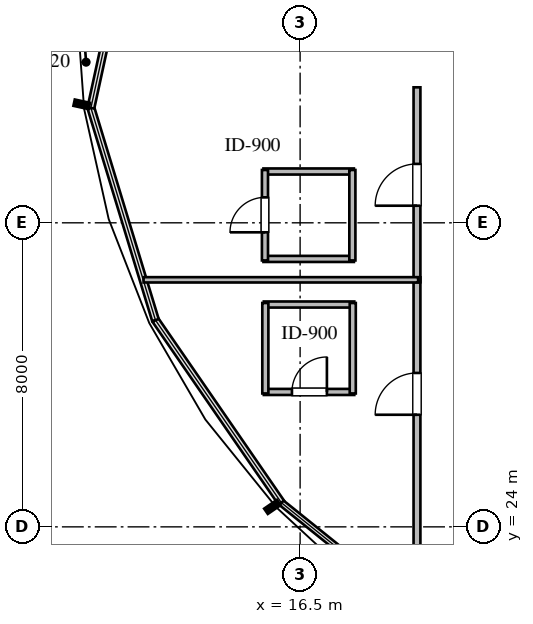
"""IFC4 building model, lengths in metres.
Left out: names, types, materials, properties, quantities, classifications, styles, units other than length and angle.
Written with IfcOpenShell. Run it as: python <this file> out.ifc"""

import sys

from ifc_helpers import new_model, si_unit, direction, frame, frame_2d, origin, place, context, subcontext, project, spatial, rectangle, extrude, element, fill, save


model = new_model("IFC4")
c1 = context("Model", 3, precision=1e-05, world=origin(), true_north=direction((0.0, 1.0)))
c2 = subcontext(c1, "Body", "Model", "MODEL_VIEW")
j1 = project(units=[si_unit("LENGTHUNIT", "METRE"), si_unit("PLANEANGLEUNIT", "RADIAN")], contexts=[c1])
p1 = place(None, origin())
s1 = spatial("IfcSite", under=j1, at=p1, CompositionType="ELEMENT")
p2 = place(p1, origin())
s2 = spatial("IfcBuilding", under=s1, at=p2, CompositionType="ELEMENT")
p3 = place(p2, frame((0.0, 0.0, 156.6)))
s3 = spatial("IfcBuildingStorey", under=s2, at=p3, CompositionType="ELEMENT", Elevation=156.6)
p4 = place(p3, frame((15.545, 27.55, 0.0), z_axis=(0.0, 0.0, 1.0), x_axis=(1.0, 0.0, 0.0)))
e1 = element("IfcWall", 1, at=p4, inside=s3, PredefinedType="PLUMBINGWALL", context=c2, shape_type="SweptSolid", body=[
    extrude(rectangle(XDim=2.38, YDim=0.16, at=frame_2d((1.19, 0.0))), origin(), (0.0, 0.0, 1.0), 3.36),
])
p5 = place(p4, frame((0.74, 0.0, 0.0)))
e2 = element("IfcOpeningElement", 2, at=p5, cuts=e1, PredefinedType="OPENING", context=c2, shape_type="SweptSolid", body=[
    extrude(rectangle(XDim=0.92, YDim=2.1, at=frame_2d((0.46, 1.05))), frame((0.0, 0.09, 0.0), z_axis=(0.0, -1.0, 0.0), x_axis=(1.0, 0.0, 0.0)), (0.0, 0.0, 1.0), 0.18),
])
p6 = place(p3, frame((15.545, 29.85, 0.0), z_axis=(0.0, 0.0, 1.0), x_axis=(1.0, 0.0, 0.0)))
e3 = element("IfcWall", 3, at=p6, inside=s3, PredefinedType="PLUMBINGWALL", context=c2, shape_type="SweptSolid", body=[
    extrude(rectangle(XDim=2.38, YDim=0.16, at=frame_2d((1.19, 0.0))), origin(), (0.0, 0.0, 1.0), 3.36),
])
for number, where, z_axis, x_axis in (
    (4, (15.585, 27.51, 0.0), (0.0, 0.0, 1.0), (0.0, 1.0, 0.0)),
    (5, (17.885, 27.51, 0.0), (0.0, 0.0, 1.0), (0.0, 1.0, 0.0)),
):
    element("IfcWall", number, at=place(p3, frame(where, z_axis=z_axis, x_axis=x_axis)), inside=s3, PredefinedType="PLUMBINGWALL", context=c2, shape_type="SweptSolid", body=[
        extrude(rectangle(XDim=2.38, YDim=0.16, at=frame_2d((1.19, 0.0))), origin(), (0.0, 0.0, 1.0), 3.36),
    ])
for number, where, z_axis, x_axis in (
    (6, (15.535, 31.05, 0.0), (0.0, 0.0, 1.0), (1.0, 0.0, 0.0)),
    (7, (15.535, 33.35, 0.0), (0.0, 0.0, 1.0), (1.0, 0.0, 0.0)),
):
    element("IfcWall", number, at=place(p3, frame(where, z_axis=z_axis, x_axis=x_axis)), inside=s3, PredefinedType="PLUMBINGWALL", context=c2, shape_type="SweptSolid", body=[
        extrude(rectangle(XDim=2.38, YDim=0.16, at=frame_2d((1.19, 0.0))), origin(), (0.0, 0.0, 1.0), 3.36),
    ])
p7 = place(p3, frame((15.575, 31.01, 0.0), z_axis=(0.0, 0.0, 1.0), x_axis=(0.0, 1.0, 0.0)))
e8 = element("IfcWall", 8, at=p7, inside=s3, PredefinedType="PLUMBINGWALL", context=c2, shape_type="SweptSolid", body=[
    extrude(rectangle(XDim=2.38, YDim=0.16, at=frame_2d((1.19, 0.0))), origin(), (0.0, 0.0, 1.0), 3.36),
])
p8 = place(p7, frame((0.74, 0.0, 0.0)))
e9 = element("IfcOpeningElement", 9, at=p8, cuts=e8, PredefinedType="OPENING", context=c2, shape_type="SweptSolid", body=[
    extrude(rectangle(XDim=0.92, YDim=2.1, at=frame_2d((0.46, 1.05))), frame((0.0, 0.09, 0.0), z_axis=(0.0, -1.0, 0.0), x_axis=(1.0, 0.0, 0.0)), (0.0, 0.0, 1.0), 0.18),
])
p9 = place(p3, frame((17.875, 31.01, 0.0), z_axis=(0.0, 0.0, 1.0), x_axis=(0.0, 1.0, 0.0)))
e10 = element("IfcWall", 10, at=p9, inside=s3, PredefinedType="PLUMBINGWALL", context=c2, shape_type="SweptSolid", body=[
    extrude(rectangle(XDim=2.38, YDim=0.16, at=frame_2d((1.19, 0.0))), origin(), (0.0, 0.0, 1.0), 3.36),
])
p10 = place(p3, frame((19.575, 21.775, 0.0), z_axis=(0.0, 0.0, 1.0), x_axis=(0.0, 1.0, 0.0)))
e11 = element("IfcWall", 11, at=p10, inside=s3, PredefinedType="PARTITIONING", context=c2, shape_type="SweptSolid", body=[
    extrude(rectangle(XDim=8.79, YDim=0.18, at=frame_2d((4.395, 0.0))), origin(), (0.0, 0.0, 1.0), 2.657),
])
p11 = place(p10, frame((5.175, 0.0, 0.0)))
e12 = element("IfcOpeningElement", 12, at=p11, cuts=e11, PredefinedType="OPENING", context=c2, shape_type="SweptSolid", body=[
    extrude(rectangle(XDim=1.1, YDim=2.1, at=frame_2d((0.55, 1.05))), frame((0.0, 0.1, 0.0), z_axis=(0.0, -1.0, 0.0), x_axis=(1.0, 0.0, 0.0)), (0.0, 0.0, 1.0), 0.2),
])
p12 = place(p3, frame((19.575, 30.435, 0.0), z_axis=(0.0, 0.0, 1.0), x_axis=(0.0, 1.0, 0.0)))
e13 = element("IfcWall", 13, at=p12, inside=s3, PredefinedType="PARTITIONING", context=c2, shape_type="SweptSolid", body=[
    extrude(rectangle(XDim=5.13, YDim=0.18, at=frame_2d((2.565, 0.0))), origin(), (0.0, 0.0, 1.0), 2.657),
])
p13 = place(p12, frame((2.015, 0.0, 0.0)))
e14 = element("IfcOpeningElement", 14, at=p13, cuts=e13, PredefinedType="OPENING", context=c2, shape_type="SweptSolid", body=[
    extrude(rectangle(XDim=1.1, YDim=2.1, at=frame_2d((0.55, 1.05))), frame((0.0, 0.1, 0.0), z_axis=(0.0, -1.0, 0.0), x_axis=(1.0, 0.0, 0.0)), (0.0, 0.0, 1.0), 0.2),
])
p14 = place(p3, frame((12.381, 30.5, 0.0), z_axis=(0.0, 0.0, 1.0), x_axis=(1.0, 0.0, 0.0)))
e15 = element("IfcWall", 15, at=p14, inside=s3, PredefinedType="PARTITIONING", context=c2, shape_type="SweptSolid", body=[
    extrude(rectangle(XDim=7.224, YDim=0.14, at=frame_2d((3.612, 0.0))), origin(), (0.0, 0.0, 1.0), 3.36),
])
p15 = place(p5, origin())
e16 = element("IfcDoor", 16, at=p15, inside=s3, OperationType="SINGLE_SWING_RIGHT", PredefinedType="DOOR", context=c2, shape_type="SweptSolid", body=[
    extrude(rectangle(XDim=0.92, YDim=2.1, at=frame_2d((0.46, 1.05))), frame((0.0, 0.025, 0.0), z_axis=(0.0, -1.0, 0.0), x_axis=(1.0, 0.0, 0.0)), (0.0, 0.0, 1.0), 0.05),
])
fill(e2, e16)
p16 = place(p8, origin())
e17 = element("IfcDoor", 17, at=p16, inside=s3, OperationType="SINGLE_SWING_LEFT", PredefinedType="DOOR", context=c2, shape_type="SweptSolid", body=[
    extrude(rectangle(XDim=0.92, YDim=2.1, at=frame_2d((0.46, 1.05))), frame((0.0, 0.025, 0.0), z_axis=(0.0, -1.0, 0.0), x_axis=(1.0, 0.0, 0.0)), (0.0, 0.0, 1.0), 0.05),
])
fill(e9, e17)
p17 = place(p11, origin())
e18 = element("IfcDoor", 18, at=p17, inside=s3, OperationType="SINGLE_SWING_LEFT", PredefinedType="DOOR", context=c2, shape_type="SweptSolid", body=[
    extrude(rectangle(XDim=1.1, YDim=2.1, at=frame_2d((0.55, 1.05))), frame((0.0, 0.025, 0.0), z_axis=(0.0, -1.0, 0.0), x_axis=(1.0, 0.0, 0.0)), (0.0, 0.0, 1.0), 0.05),
])
fill(e12, e18)
p18 = place(p13, origin())
e19 = element("IfcDoor", 19, at=p18, inside=s3, OperationType="SINGLE_SWING_LEFT", PredefinedType="DOOR", context=c2, shape_type="SweptSolid", body=[
    extrude(rectangle(XDim=1.1, YDim=2.1, at=frame_2d((0.55, 1.05))), frame((0.0, 0.025, 0.0), z_axis=(0.0, -1.0, 0.0), x_axis=(1.0, 0.0, 0.0)), (0.0, 0.0, 1.0), 0.05),
])
fill(e14, e19)
save(model, sys.argv[1])
